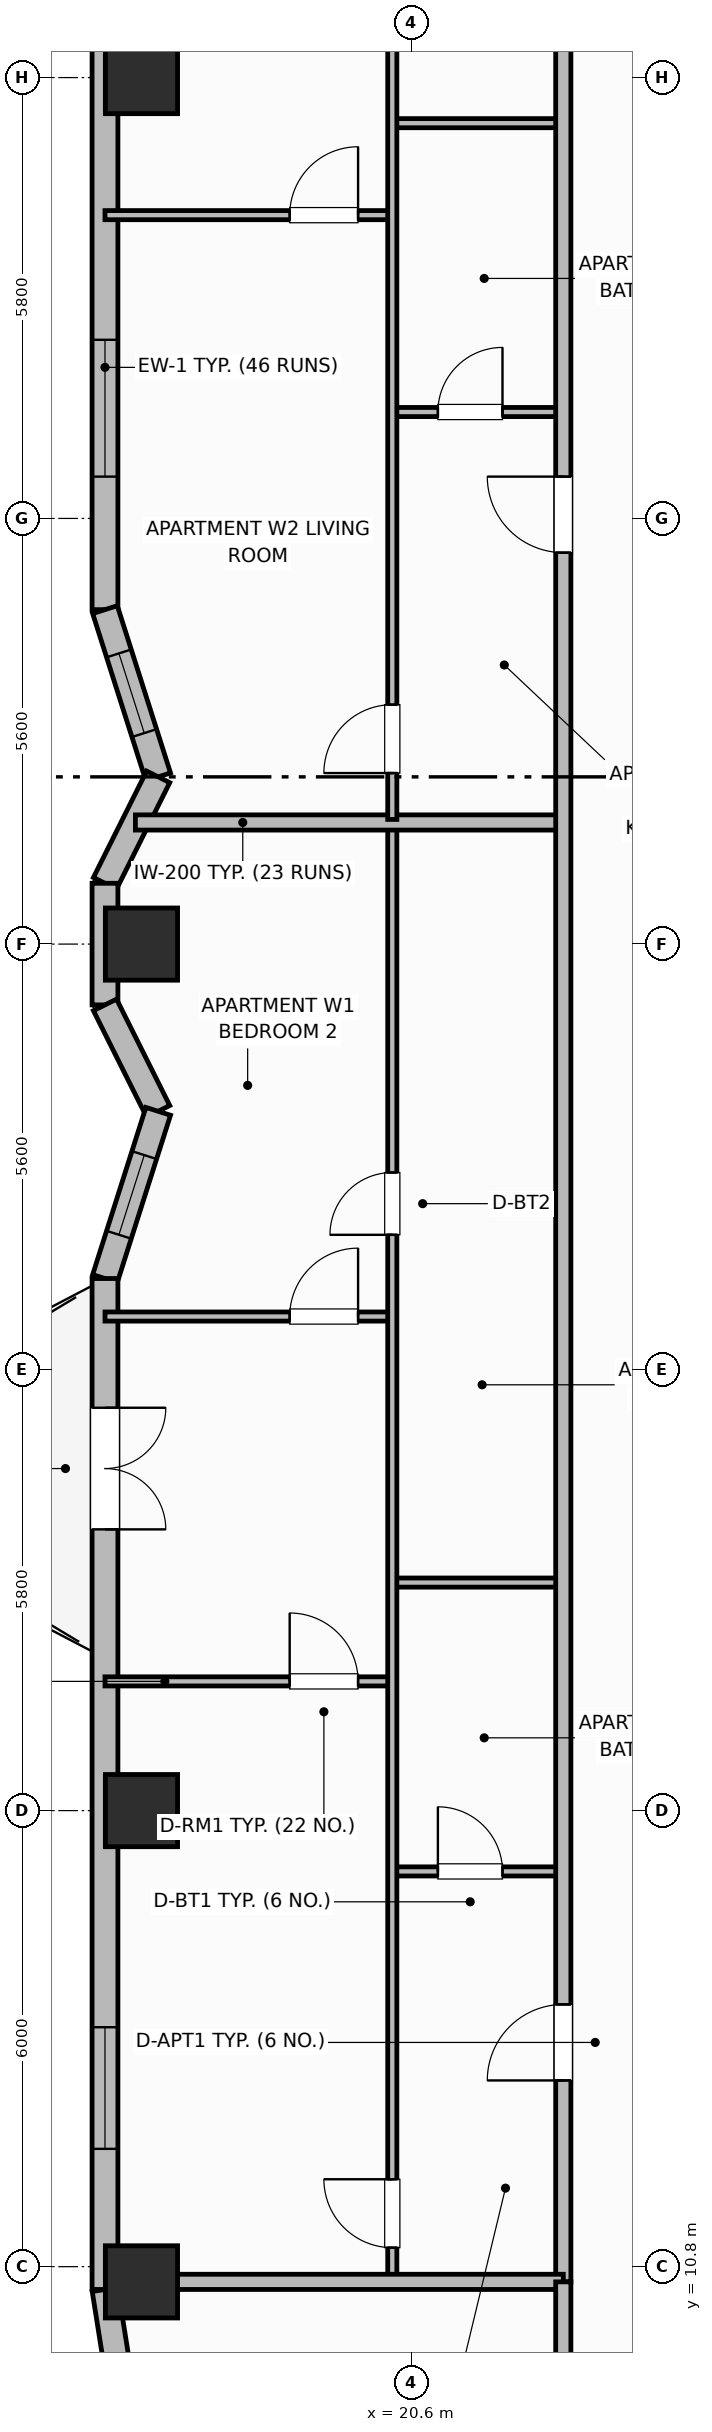
"""IFC4 building model, lengths in metres.
Left out: names, types, materials, properties, quantities, classifications, styles, units other than length and angle.
Written with IfcOpenShell. Run it as: python <this file> out.ifc"""

import sys

from ifc_helpers import new_model, si_unit, direction, frame, frame_2d, origin, origin_2d, place, context, subcontext, project, spatial, rectangle, extrude, element, fill, save


model = new_model("IFC4")
c1 = context("Model", 3, precision=1e-05, world=origin(), true_north=direction((0.0, 1.0)))
c2 = subcontext(c1, "Body", "Model", "MODEL_VIEW")
j1 = project(units=[si_unit("LENGTHUNIT", "METRE"), si_unit("PLANEANGLEUNIT", "RADIAN")], contexts=[c1])
p1 = place(None, origin())
s1 = spatial("IfcSite", under=j1, at=p1, CompositionType="ELEMENT")
p2 = place(p1, origin())
s2 = spatial("IfcBuilding", under=s1, at=p2, CompositionType="ELEMENT")
p3 = place(p2, frame((0.0, 0.0, 184.8)))
s3 = spatial("IfcBuildingStorey", under=s2, at=p3, CompositionType="ELEMENT", Elevation=184.8)
for number, where, z_axis, x_axis in (
    (1, (17.05, 10.6, 0.0), (0.0, 0.0, 1.0), (1.0, 0.0, 0.0)),
    (2, (17.05, 16.8, 0.0), (0.0, 0.0, 1.0), (1.0, 0.0, 0.0)),
    (3, (17.05, 28.2, 0.0), (0.0, 0.0, 1.0), (1.0, 0.0, 0.0)),
    (4, (17.05, 39.6, 0.0), (0.0, 0.0, 1.0), (1.0, 0.0, 0.0)),
):
    element("IfcColumn", number, at=place(p3, frame(where, z_axis=z_axis, x_axis=x_axis)), inside=s3, PredefinedType="COLUMN", context=c2, shape_type="SweptSolid", body=[
        extrude(rectangle(XDim=0.95, YDim=0.95, at=origin_2d()), origin(), (0.0, 0.0, 1.0), 3.7),
    ])
p4 = place(p3, frame((16.57, 10.5, 0.0), z_axis=(0.0, 0.0, 1.0), x_axis=(0.156514556949, -0.987675651954, 0.0)))
e5 = element("IfcWall", 5, at=p4, inside=s3, PredefinedType="SOLIDWALL", context=c2, shape_type="SweptSolid", body=[
    extrude(rectangle(XDim=1.135, YDim=0.34, at=frame_2d((0.568, 0.0))), origin(), (0.0, 0.0, 1.0), 2.72),
])
p5 = place(p3, frame((16.57, 45.9, 0.0), z_axis=(0.0, 0.0, 1.0), x_axis=(0.0, -1.0, 0.0)))
e6 = element("IfcWall", 6, at=p5, inside=s3, PredefinedType="SOLIDWALL", context=c2, shape_type="SweptSolid", body=[
    extrude(rectangle(XDim=13.3, YDim=0.34, at=frame_2d((6.65, 0.0))), origin(), (0.0, 0.0, 1.0), 2.72),
])
p6 = place(p5, frame((1.75, 0.0, 0.75)))
e7 = element("IfcOpeningElement", 7, at=p6, cuts=e6, PredefinedType="OPENING", context=c2, shape_type="SweptSolid", body=[
    extrude(rectangle(XDim=1.8, YDim=1.85, at=frame_2d((0.9, 0.925))), frame((0.0, 0.18, 0.0), z_axis=(0.0, -1.0, 0.0), x_axis=(1.0, 0.0, 0.0)), (0.0, 0.0, 1.0), 0.36),
])
p7 = place(p5, frame((9.75, 0.0, 0.75)))
e8 = element("IfcOpeningElement", 8, at=p7, cuts=e6, PredefinedType="OPENING", context=c2, shape_type="SweptSolid", body=[
    extrude(rectangle(XDim=1.8, YDim=1.85, at=frame_2d((0.9, 0.925))), frame((0.0, 0.18, 0.0), z_axis=(0.0, -1.0, 0.0), x_axis=(1.0, 0.0, 0.0)), (0.0, 0.0, 1.0), 0.36),
])
p8 = place(p3, frame((16.57, 32.6, 0.0), z_axis=(0.0, 0.0, 1.0), x_axis=(0.303160011437, -0.952939666225, 0.0)))
e9 = element("IfcWall", 9, at=p8, inside=s3, PredefinedType="SOLIDWALL", context=c2, shape_type="SweptSolid", body=[
    extrude(rectangle(XDim=2.309, YDim=0.34, at=frame_2d((1.154, 0.0))), origin(), (0.0, 0.0, 1.0), 2.72),
])
p9 = place(p8, frame((0.604, 0.0, 0.91)))
e10 = element("IfcOpeningElement", 10, at=p9, cuts=e9, PredefinedType="OPENING", context=c2, shape_type="SweptSolid", body=[
    extrude(rectangle(XDim=1.1, YDim=1.65, at=frame_2d((0.55, 0.825))), frame((0.0, 0.18, 0.0), z_axis=(0.0, -1.0, 0.0), x_axis=(1.0, 0.0, 0.0)), (0.0, 0.0, 1.0), 0.36),
])
p10 = place(p3, frame((17.27, 30.4, 0.0), z_axis=(0.0, 0.0, 1.0), x_axis=(-0.4472135955, -0.894427191, 0.0)))
e11 = element("IfcWall", 11, at=p10, inside=s3, PredefinedType="SOLIDWALL", context=c2, shape_type="SweptSolid", body=[
    extrude(rectangle(XDim=1.565, YDim=0.34, at=frame_2d((0.783, 0.0))), origin(), (0.0, 0.0, 1.0), 2.72),
])
p11 = place(p3, frame((16.57, 29.0, 0.0), z_axis=(0.0, 0.0, 1.0), x_axis=(0.0, -1.0, 0.0)))
e12 = element("IfcWall", 12, at=p11, inside=s3, PredefinedType="SOLIDWALL", context=c2, shape_type="SweptSolid", body=[
    extrude(rectangle(XDim=1.6, YDim=0.34, at=frame_2d((0.8, 0.0))), origin(), (0.0, 0.0, 1.0), 2.72),
])
p12 = place(p3, frame((16.57, 27.4, 0.0), z_axis=(0.0, 0.0, 1.0), x_axis=(0.4472135955, -0.894427191, 0.0)))
e13 = element("IfcWall", 13, at=p12, inside=s3, PredefinedType="SOLIDWALL", context=c2, shape_type="SweptSolid", body=[
    extrude(rectangle(XDim=1.565, YDim=0.34, at=frame_2d((0.783, 0.0))), origin(), (0.0, 0.0, 1.0), 2.72),
])
p13 = place(p3, frame((17.27, 26.0, 0.0), z_axis=(0.0, 0.0, 1.0), x_axis=(-0.303190562272, -0.952929946507, 0.0)))
e14 = element("IfcWall", 14, at=p13, inside=s3, PredefinedType="SOLIDWALL", context=c2, shape_type="SweptSolid", body=[
    extrude(rectangle(XDim=2.309, YDim=0.34, at=frame_2d((1.154, 0.0))), origin(), (0.0, 0.0, 1.0), 2.72),
])
p14 = place(p13, frame((0.604, 0.0, 0.91)))
e15 = element("IfcOpeningElement", 15, at=p14, cuts=e14, PredefinedType="OPENING", context=c2, shape_type="SweptSolid", body=[
    extrude(rectangle(XDim=1.1, YDim=1.65, at=frame_2d((0.55, 0.825))), frame((0.0, 0.18, 0.0), z_axis=(0.0, -1.0, 0.0), x_axis=(1.0, 0.0, 0.0)), (0.0, 0.0, 1.0), 0.36),
])
p15 = place(p3, frame((16.57, 23.8, 0.0), z_axis=(0.0, 0.0, 1.0), x_axis=(0.0, -1.0, 0.0)))
e16 = element("IfcWall", 16, at=p15, inside=s3, PredefinedType="SOLIDWALL", context=c2, shape_type="SweptSolid", body=[
    extrude(rectangle(XDim=13.3, YDim=0.34, at=frame_2d((6.65, 0.0))), origin(), (0.0, 0.0, 1.0), 2.72),
])
p16 = place(p15, frame((1.7, 0.0, 0.0)))
e17 = element("IfcOpeningElement", 17, at=p16, cuts=e16, PredefinedType="OPENING", context=c2, shape_type="SweptSolid", body=[
    extrude(rectangle(XDim=1.6, YDim=2.1, at=frame_2d((0.8, 1.05))), frame((0.0, 0.18, 0.0), z_axis=(0.0, -1.0, 0.0), x_axis=(1.0, 0.0, 0.0)), (0.0, 0.0, 1.0), 0.36),
])
p17 = place(p15, frame((9.85, 0.0, 0.7)))
e18 = element("IfcOpeningElement", 18, at=p17, cuts=e16, PredefinedType="OPENING", context=c2, shape_type="SweptSolid", body=[
    extrude(rectangle(XDim=1.6, YDim=1.9, at=frame_2d((0.8, 0.95))), frame((0.0, 0.18, 0.0), z_axis=(0.0, -1.0, 0.0), x_axis=(1.0, 0.0, 0.0)), (0.0, 0.0, 1.0), 0.36),
])
p18 = place(p3, frame((20.35, 16.0, 0.0), z_axis=(0.0, 0.0, 1.0), x_axis=(1.0, 0.0, 0.0)))
e19 = element("IfcWall", 19, at=p18, inside=s3, PredefinedType="PARTITIONING", context=c2, shape_type="SweptSolid", body=[
    extrude(rectangle(XDim=2.25, YDim=0.12, at=frame_2d((1.125, 0.0))), origin(), (0.0, 0.0, 1.0), 2.55),
])
p19 = place(p18, frame((0.6, 0.0, 0.0)))
e20 = element("IfcOpeningElement", 20, at=p19, cuts=e19, PredefinedType="OPENING", context=c2, shape_type="SweptSolid", body=[
    extrude(rectangle(XDim=0.85, YDim=2.1, at=frame_2d((0.425, 1.05))), frame((0.0, 0.07, 0.0), z_axis=(0.0, -1.0, 0.0), x_axis=(1.0, 0.0, 0.0)), (0.0, 0.0, 1.0), 0.14),
])
p20 = place(p3, frame((20.35, 19.8, 0.0), z_axis=(0.0, 0.0, 1.0), x_axis=(1.0, 0.0, 0.0)))
e21 = element("IfcWall", 21, at=p20, inside=s3, PredefinedType="PARTITIONING", context=c2, shape_type="SweptSolid", body=[
    extrude(rectangle(XDim=2.25, YDim=0.12, at=frame_2d((1.125, 0.0))), origin(), (0.0, 0.0, 1.0), 2.55),
])
p21 = place(p3, frame((16.57, 18.5, 0.0), z_axis=(0.0, 0.0, 1.0), x_axis=(1.0, 0.0, 0.0)))
e22 = element("IfcWall", 22, at=p21, inside=s3, PredefinedType="PARTITIONING", context=c2, shape_type="SweptSolid", body=[
    extrude(rectangle(XDim=3.78, YDim=0.12, at=frame_2d((1.89, 0.0))), origin(), (0.0, 0.0, 1.0), 2.55),
])
p22 = place(p21, frame((2.43, 0.0, 0.0)))
e23 = element("IfcOpeningElement", 23, at=p22, cuts=e22, PredefinedType="OPENING", context=c2, shape_type="SweptSolid", body=[
    extrude(rectangle(XDim=0.9, YDim=2.1, at=frame_2d((0.45, 1.05))), frame((0.0, 0.07, 0.0), z_axis=(0.0, -1.0, 0.0), x_axis=(1.0, 0.0, 0.0)), (0.0, 0.0, 1.0), 0.14),
])
p23 = place(p3, frame((16.57, 23.3, 0.0), z_axis=(0.0, 0.0, 1.0), x_axis=(1.0, 0.0, 0.0)))
e24 = element("IfcWall", 24, at=p23, inside=s3, PredefinedType="PARTITIONING", context=c2, shape_type="SweptSolid", body=[
    extrude(rectangle(XDim=3.78, YDim=0.12, at=frame_2d((1.89, 0.0))), origin(), (0.0, 0.0, 1.0), 2.55),
])
p24 = place(p23, frame((2.43, 0.0, 0.0)))
e25 = element("IfcOpeningElement", 25, at=p24, cuts=e24, PredefinedType="OPENING", context=c2, shape_type="SweptSolid", body=[
    extrude(rectangle(XDim=0.9, YDim=2.1, at=frame_2d((0.45, 1.05))), frame((0.0, 0.07, 0.0), z_axis=(0.0, -1.0, 0.0), x_axis=(1.0, 0.0, 0.0)), (0.0, 0.0, 1.0), 0.14),
])
p25 = place(p3, frame((20.35, 10.64, 0.0), z_axis=(0.0, 0.0, 1.0), x_axis=(0.0, 1.0, 0.0)))
e26 = element("IfcWall", 26, at=p25, inside=s3, PredefinedType="PARTITIONING", context=c2, shape_type="SweptSolid", body=[
    extrude(rectangle(XDim=19.12, YDim=0.12, at=frame_2d((9.56, 0.0))), origin(), (0.0, 0.0, 1.0), 2.55),
])
p26 = place(p25, frame((0.41, 0.0, 0.0)))
e27 = element("IfcOpeningElement", 27, at=p26, cuts=e26, PredefinedType="OPENING", context=c2, shape_type="SweptSolid", body=[
    extrude(rectangle(XDim=0.9, YDim=2.1, at=frame_2d((0.45, 1.05))), frame((0.0, 0.07, 0.0), z_axis=(0.0, -1.0, 0.0), x_axis=(1.0, 0.0, 0.0)), (0.0, 0.0, 1.0), 0.14),
])
p27 = place(p25, frame((13.735, 0.0, 0.0)))
e28 = element("IfcOpeningElement", 28, at=p27, cuts=e26, PredefinedType="OPENING", context=c2, shape_type="SweptSolid", body=[
    extrude(rectangle(XDim=0.82, YDim=2.08, at=frame_2d((0.41, 1.04))), frame((0.0, 0.07, 0.0), z_axis=(0.0, -1.0, 0.0), x_axis=(1.0, 0.0, 0.0)), (0.0, 0.0, 1.0), 0.14),
])
p28 = place(p3, frame((16.97, 29.8, 0.0), z_axis=(0.0, 0.0, 1.0), x_axis=(1.0, 0.0, 0.0)))
e29 = element("IfcWall", 29, at=p28, inside=s3, PredefinedType="PARTITIONING", context=c2, shape_type="SweptSolid", body=[
    extrude(rectangle(XDim=5.63, YDim=0.2, at=frame_2d((2.815, 0.0))), origin(), (0.0, 0.0, 1.0), 2.55),
])
p29 = place(p3, frame((20.35, 35.2, 0.0), z_axis=(0.0, 0.0, 1.0), x_axis=(1.0, 0.0, 0.0)))
e30 = element("IfcWall", 30, at=p29, inside=s3, PredefinedType="PARTITIONING", context=c2, shape_type="SweptSolid", body=[
    extrude(rectangle(XDim=2.25, YDim=0.12, at=frame_2d((1.125, 0.0))), origin(), (0.0, 0.0, 1.0), 2.55),
])
p30 = place(p29, frame((0.6, 0.0, 0.0)))
e31 = element("IfcOpeningElement", 31, at=p30, cuts=e30, PredefinedType="OPENING", context=c2, shape_type="SweptSolid", body=[
    extrude(rectangle(XDim=0.85, YDim=2.1, at=frame_2d((0.425, 1.05))), frame((0.0, 0.07, 0.0), z_axis=(0.0, -1.0, 0.0), x_axis=(1.0, 0.0, 0.0)), (0.0, 0.0, 1.0), 0.14),
])
p31 = place(p3, frame((20.35, 39.0, 0.0), z_axis=(0.0, 0.0, 1.0), x_axis=(1.0, 0.0, 0.0)))
e32 = element("IfcWall", 32, at=p31, inside=s3, PredefinedType="PARTITIONING", context=c2, shape_type="SweptSolid", body=[
    extrude(rectangle(XDim=2.25, YDim=0.12, at=frame_2d((1.125, 0.0))), origin(), (0.0, 0.0, 1.0), 2.55),
])
p32 = place(p3, frame((16.57, 37.79, 0.0), z_axis=(0.0, 0.0, 1.0), x_axis=(1.0, 0.0, 0.0)))
e33 = element("IfcWall", 33, at=p32, inside=s3, PredefinedType="PARTITIONING", context=c2, shape_type="SweptSolid", body=[
    extrude(rectangle(XDim=3.78, YDim=0.12, at=frame_2d((1.89, 0.0))), origin(), (0.0, 0.0, 1.0), 2.55),
])
p33 = place(p32, frame((2.43, 0.0, 0.0)))
e34 = element("IfcOpeningElement", 34, at=p33, cuts=e33, PredefinedType="OPENING", context=c2, shape_type="SweptSolid", body=[
    extrude(rectangle(XDim=0.9, YDim=2.1, at=frame_2d((0.45, 1.05))), frame((0.0, 0.07, 0.0), z_axis=(0.0, -1.0, 0.0), x_axis=(1.0, 0.0, 0.0)), (0.0, 0.0, 1.0), 0.14),
])
p34 = place(p3, frame((20.35, 29.84, 0.0), z_axis=(0.0, 0.0, 1.0), x_axis=(0.0, 1.0, 0.0)))
e35 = element("IfcWall", 35, at=p34, inside=s3, PredefinedType="PARTITIONING", context=c2, shape_type="SweptSolid", body=[
    extrude(rectangle(XDim=15.92, YDim=0.12, at=frame_2d((7.96, 0.0))), origin(), (0.0, 0.0, 1.0), 2.55),
])
p35 = place(p34, frame((0.61, 0.0, 0.0)))
e36 = element("IfcOpeningElement", 36, at=p35, cuts=e35, PredefinedType="OPENING", context=c2, shape_type="SweptSolid", body=[
    extrude(rectangle(XDim=0.9, YDim=2.1, at=frame_2d((0.45, 1.05))), frame((0.0, 0.07, 0.0), z_axis=(0.0, -1.0, 0.0), x_axis=(1.0, 0.0, 0.0)), (0.0, 0.0, 1.0), 0.14),
])
p36 = place(p34, frame((12.135, 0.0, 0.0)))
e37 = element("IfcOpeningElement", 37, at=p36, cuts=e35, PredefinedType="OPENING", context=c2, shape_type="SweptSolid", body=[
    extrude(rectangle(XDim=0.82, YDim=2.08, at=frame_2d((0.41, 1.04))), frame((0.0, 0.07, 0.0), z_axis=(0.0, -1.0, 0.0), x_axis=(1.0, 0.0, 0.0)), (0.0, 0.0, 1.0), 0.14),
])
p37 = place(p3, frame((22.6, 10.6, 0.0), z_axis=(0.0, 0.0, 1.0), x_axis=(0.0, 1.0, 0.0)))
e38 = element("IfcWall", 38, at=p37, inside=s3, PredefinedType="PARTITIONING", context=c2, shape_type="SweptSolid", body=[
    extrude(rectangle(XDim=35.2, YDim=0.2, at=frame_2d((17.6, 0.0))), origin(), (0.0, 0.0, 1.0), 2.55),
])
p38 = place(p37, frame((2.65, 0.0, 0.0)))
e39 = element("IfcOpeningElement", 39, at=p38, cuts=e38, PredefinedType="OPENING", context=c2, shape_type="SweptSolid", body=[
    extrude(rectangle(XDim=1.0, YDim=2.15, at=frame_2d((0.5, 1.075))), frame((0.0, 0.11, 0.0), z_axis=(0.0, -1.0, 0.0), x_axis=(1.0, 0.0, 0.0)), (0.0, 0.0, 1.0), 0.22),
])
p39 = place(p37, frame((22.75, 0.0, 0.0)))
e40 = element("IfcOpeningElement", 40, at=p39, cuts=e38, PredefinedType="OPENING", context=c2, shape_type="SweptSolid", body=[
    extrude(rectangle(XDim=1.0, YDim=2.15, at=frame_2d((0.5, 1.075))), frame((0.0, 0.11, 0.0), z_axis=(0.0, -1.0, 0.0), x_axis=(1.0, 0.0, 0.0)), (0.0, 0.0, 1.0), 0.22),
])
p40 = place(p3, frame((16.99, 10.6, 0.0), z_axis=(0.0, 0.0, 1.0), x_axis=(1.0, 0.0, 0.0)))
e41 = element("IfcWall", 41, at=p40, inside=s3, PredefinedType="PARTITIONING", context=c2, shape_type="SweptSolid", body=[
    extrude(rectangle(XDim=5.61, YDim=0.2, at=frame_2d((2.805, 0.0))), origin(), (0.0, 0.0, 1.0), 2.55),
])
p41 = place(p3, frame((22.6, 6.87, 0.0), z_axis=(0.0, 0.0, 1.0), x_axis=(0.0, 1.0, 0.0)))
e42 = element("IfcWall", 42, at=p41, inside=s3, PredefinedType="PARTITIONING", context=c2, shape_type="SweptSolid", body=[
    extrude(rectangle(XDim=3.73, YDim=0.2, at=frame_2d((1.865, 0.0))), origin(), (0.0, 0.0, 1.0), 2.55),
])
p42 = place(p7, origin())
e43 = element("IfcWindow", 43, at=p42, inside=s3, PartitioningType="SINGLE_PANEL", PredefinedType="WINDOW", context=c2, shape_type="SweptSolid", body=[
    extrude(rectangle(XDim=1.8, YDim=1.85, at=frame_2d((0.9, 0.925))), frame((0.0, 0.03, 0.0), z_axis=(0.0, -1.0, 0.0), x_axis=(1.0, 0.0, 0.0)), (0.0, 0.0, 1.0), 0.06),
])
fill(e8, e43)
p43 = place(p9, origin())
e44 = element("IfcWindow", 44, at=p43, inside=s3, PartitioningType="SINGLE_PANEL", PredefinedType="WINDOW", context=c2, shape_type="SweptSolid", body=[
    extrude(rectangle(XDim=1.1, YDim=1.65, at=frame_2d((0.55, 0.825))), frame((0.0, 0.03, 0.0), z_axis=(0.0, -1.0, 0.0), x_axis=(1.0, 0.0, 0.0)), (0.0, 0.0, 1.0), 0.06),
])
fill(e10, e44)
p44 = place(p14, origin())
e45 = element("IfcWindow", 45, at=p44, inside=s3, PartitioningType="SINGLE_PANEL", PredefinedType="WINDOW", context=c2, shape_type="SweptSolid", body=[
    extrude(rectangle(XDim=1.1, YDim=1.65, at=frame_2d((0.55, 0.825))), frame((0.0, 0.03, 0.0), z_axis=(0.0, -1.0, 0.0), x_axis=(1.0, 0.0, 0.0)), (0.0, 0.0, 1.0), 0.06),
])
fill(e15, e45)
p45 = place(p16, origin())
e46 = element("IfcDoor", 46, at=p45, inside=s3, OperationType="DOUBLE_DOOR_SINGLE_SWING", PredefinedType="DOOR", context=c2, shape_type="SweptSolid", body=[
    extrude(rectangle(XDim=1.6, YDim=2.1, at=frame_2d((0.8, 1.05))), frame((0.0, 0.025, 0.0), z_axis=(0.0, -1.0, 0.0), x_axis=(1.0, 0.0, 0.0)), (0.0, 0.0, 1.0), 0.05),
])
fill(e17, e46)
p46 = place(p17, origin())
e47 = element("IfcWindow", 47, at=p46, inside=s3, PartitioningType="SINGLE_PANEL", PredefinedType="WINDOW", context=c2, shape_type="SweptSolid", body=[
    extrude(rectangle(XDim=1.6, YDim=1.9, at=frame_2d((0.8, 0.95))), frame((0.0, 0.03, 0.0), z_axis=(0.0, -1.0, 0.0), x_axis=(1.0, 0.0, 0.0)), (0.0, 0.0, 1.0), 0.06),
])
fill(e18, e47)
p47 = place(p19, origin())
e48 = element("IfcDoor", 48, at=p47, inside=s3, OperationType="SINGLE_SWING_LEFT", PredefinedType="DOOR", context=c2, shape_type="SweptSolid", body=[
    extrude(rectangle(XDim=0.85, YDim=2.1, at=frame_2d((0.425, 1.05))), frame((0.0, 0.025, 0.0), z_axis=(0.0, -1.0, 0.0), x_axis=(1.0, 0.0, 0.0)), (0.0, 0.0, 1.0), 0.05),
])
fill(e20, e48)
p48 = place(p22, origin())
e49 = element("IfcDoor", 49, at=p48, inside=s3, OperationType="SINGLE_SWING_LEFT", PredefinedType="DOOR", context=c2, shape_type="SweptSolid", body=[
    extrude(rectangle(XDim=0.9, YDim=2.1, at=frame_2d((0.45, 1.05))), frame((0.0, 0.025, 0.0), z_axis=(0.0, -1.0, 0.0), x_axis=(1.0, 0.0, 0.0)), (0.0, 0.0, 1.0), 0.05),
])
fill(e23, e49)
p49 = place(p24, origin())
e50 = element("IfcDoor", 50, at=p49, inside=s3, OperationType="SINGLE_SWING_RIGHT", PredefinedType="DOOR", context=c2, shape_type="SweptSolid", body=[
    extrude(rectangle(XDim=0.9, YDim=2.1, at=frame_2d((0.45, 1.05))), frame((0.0, 0.025, 0.0), z_axis=(0.0, -1.0, 0.0), x_axis=(1.0, 0.0, 0.0)), (0.0, 0.0, 1.0), 0.05),
])
fill(e25, e50)
p50 = place(p26, origin())
e51 = element("IfcDoor", 51, at=p50, inside=s3, OperationType="SINGLE_SWING_RIGHT", PredefinedType="DOOR", context=c2, shape_type="SweptSolid", body=[
    extrude(rectangle(XDim=0.9, YDim=2.1, at=frame_2d((0.45, 1.05))), frame((0.0, 0.025, 0.0), z_axis=(0.0, -1.0, 0.0), x_axis=(1.0, 0.0, 0.0)), (0.0, 0.0, 1.0), 0.05),
])
fill(e27, e51)
p51 = place(p27, origin())
e52 = element("IfcDoor", 52, at=p51, inside=s3, OperationType="SINGLE_SWING_LEFT", PredefinedType="DOOR", context=c2, shape_type="SweptSolid", body=[
    extrude(rectangle(XDim=0.82, YDim=2.08, at=frame_2d((0.41, 1.04))), frame((0.0, 0.025, 0.0), z_axis=(0.0, -1.0, 0.0), x_axis=(1.0, 0.0, 0.0)), (0.0, 0.0, 1.0), 0.05),
])
fill(e28, e52)
p52 = place(p30, origin())
e53 = element("IfcDoor", 53, at=p52, inside=s3, OperationType="SINGLE_SWING_RIGHT", PredefinedType="DOOR", context=c2, shape_type="SweptSolid", body=[
    extrude(rectangle(XDim=0.85, YDim=2.1, at=frame_2d((0.425, 1.05))), frame((0.0, 0.025, 0.0), z_axis=(0.0, -1.0, 0.0), x_axis=(1.0, 0.0, 0.0)), (0.0, 0.0, 1.0), 0.05),
])
fill(e31, e53)
p53 = place(p33, origin())
e54 = element("IfcDoor", 54, at=p53, inside=s3, OperationType="SINGLE_SWING_RIGHT", PredefinedType="DOOR", context=c2, shape_type="SweptSolid", body=[
    extrude(rectangle(XDim=0.9, YDim=2.1, at=frame_2d((0.45, 1.05))), frame((0.0, 0.025, 0.0), z_axis=(0.0, -1.0, 0.0), x_axis=(1.0, 0.0, 0.0)), (0.0, 0.0, 1.0), 0.05),
])
fill(e34, e54)
p54 = place(p35, origin())
e55 = element("IfcDoor", 55, at=p54, inside=s3, OperationType="SINGLE_SWING_LEFT", PredefinedType="DOOR", context=c2, shape_type="SweptSolid", body=[
    extrude(rectangle(XDim=0.9, YDim=2.1, at=frame_2d((0.45, 1.05))), frame((0.0, 0.025, 0.0), z_axis=(0.0, -1.0, 0.0), x_axis=(1.0, 0.0, 0.0)), (0.0, 0.0, 1.0), 0.05),
])
fill(e36, e55)
p55 = place(p38, origin())
e56 = element("IfcDoor", 56, at=p55, inside=s3, OperationType="SINGLE_SWING_LEFT", PredefinedType="DOOR", context=c2, shape_type="SweptSolid", body=[
    extrude(rectangle(XDim=1.0, YDim=2.15, at=frame_2d((0.5, 1.075))), frame((0.0, 0.025, 0.0), z_axis=(0.0, -1.0, 0.0), x_axis=(1.0, 0.0, 0.0)), (0.0, 0.0, 1.0), 0.05),
])
fill(e39, e56)
p56 = place(p39, origin())
e57 = element("IfcDoor", 57, at=p56, inside=s3, OperationType="SINGLE_SWING_RIGHT", PredefinedType="DOOR", context=c2, shape_type="SweptSolid", body=[
    extrude(rectangle(XDim=1.0, YDim=2.15, at=frame_2d((0.5, 1.075))), frame((0.0, 0.025, 0.0), z_axis=(0.0, -1.0, 0.0), x_axis=(1.0, 0.0, 0.0)), (0.0, 0.0, 1.0), 0.05),
])
fill(e40, e57)
save(model, sys.argv[1])
